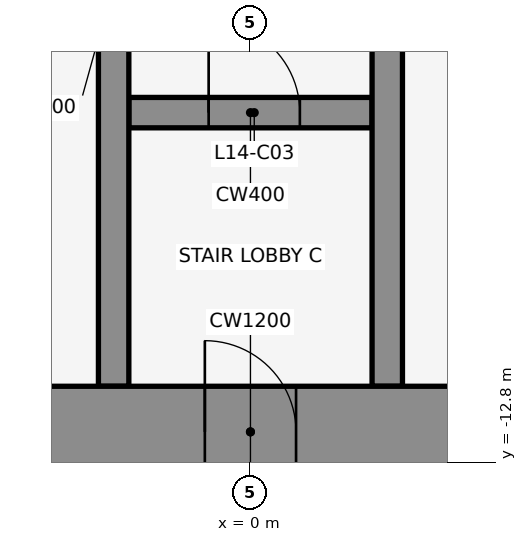
"""IFC4 building model, lengths in metres.
Left out: names, types, materials, properties, quantities, classifications, styles, units other than length and angle.
Written with IfcOpenShell. Run it as: python <this file> out.ifc"""

import sys

from ifc_helpers import new_model, si_unit, direction, frame, frame_2d, origin, place, context, subcontext, project, spatial, rectangle, extrude, element, fill, save


model = new_model("IFC4")
c1 = context("Model", 3, precision=1e-05, world=origin(), true_north=direction((0.0, 1.0)))
c2 = subcontext(c1, "Body", "Model", "MODEL_VIEW")
j1 = project(units=[si_unit("LENGTHUNIT", "METRE"), si_unit("PLANEANGLEUNIT", "RADIAN")], contexts=[c1])
p1 = place(None, origin())
s1 = spatial("IfcSite", under=j1, at=p1, CompositionType="ELEMENT")
p2 = place(p1, origin())
s2 = spatial("IfcBuilding", under=s1, at=p2, CompositionType="ELEMENT")
p3 = place(p2, frame((0.0, 0.0, 71.0)))
s3 = spatial("IfcBuildingStorey", under=s2, at=p3, CompositionType="ELEMENT", Elevation=71.0)
p4 = place(p3, frame((-1.6, -8.2, 0.0), z_axis=(0.0, 0.0, 1.0), x_axis=(1.0, 0.0, 0.0)))
e1 = element("IfcWall", 1, at=p4, inside=s3, PredefinedType="SHEAR", context=c2, shape_type="SweptSolid", body=[
    extrude(rectangle(XDim=3.2, YDim=0.4, at=frame_2d((1.6, 0.0))), origin(), (0.0, 0.0, 1.0), 4.5),
])
p5 = place(p4, frame((1.05, 0.0, 0.0)))
e2 = element("IfcOpeningElement", 2, at=p5, cuts=e1, PredefinedType="OPENING", context=c2, shape_type="SweptSolid", body=[
    extrude(rectangle(XDim=1.2, YDim=2.1, at=frame_2d((0.6, 1.05))), frame((0.0, 0.212, 0.0), z_axis=(0.0, -1.0, 0.0), x_axis=(1.0, 0.0, 0.0)), (0.0, 0.0, 1.0), 0.424),
])
for number, where, z_axis, x_axis in (
    (3, (-1.8, -11.8, 0.0), (0.0, 0.0, 1.0), (0.0, 1.0, 0.0)),
    (4, (1.8, -11.8, 0.0), (0.0, 0.0, 1.0), (0.0, 1.0, 0.0)),
):
    element("IfcWall", number, at=place(p3, frame(where, z_axis=z_axis, x_axis=x_axis)), inside=s3, PredefinedType="SHEAR", context=c2, shape_type="SweptSolid", body=[
        extrude(rectangle(XDim=10.6, YDim=0.4, at=frame_2d((5.3, 0.0))), origin(), (0.0, 0.0, 1.0), 4.5),
    ])
p6 = place(p3, frame((-22.0, -12.4, 0.0), z_axis=(0.0, 0.0, 1.0), x_axis=(1.0, 0.0, 0.0)))
e5 = element("IfcWall", 5, at=p6, inside=s3, PredefinedType="SHEAR", context=c2, shape_type="SweptSolid", body=[
    extrude(rectangle(XDim=44.0, YDim=1.2, at=frame_2d((22.0, 0.0))), origin(), (0.0, 0.0, 1.0), 4.5),
])
p7 = place(p6, frame((2.2, 0.0, 0.0)))
e6 = element("IfcOpeningElement", 6, at=p7, cuts=e5, PredefinedType="OPENING", context=c2, shape_type="SweptSolid", body=[
    extrude(rectangle(XDim=1.2, YDim=2.1, at=frame_2d((0.6, 1.05))), frame((0.0, 0.612, 0.0), z_axis=(0.0, -1.0, 0.0), x_axis=(1.0, 0.0, 0.0)), (0.0, 0.0, 1.0), 1.224),
])
p8 = place(p6, frame((21.4, 0.0, 0.0)))
e7 = element("IfcOpeningElement", 7, at=p8, cuts=e5, PredefinedType="OPENING", context=c2, shape_type="SweptSolid", body=[
    extrude(rectangle(XDim=1.2, YDim=2.1, at=frame_2d((0.6, 1.05))), frame((0.0, 0.612, 0.0), z_axis=(0.0, -1.0, 0.0), x_axis=(1.0, 0.0, 0.0)), (0.0, 0.0, 1.0), 1.224),
])
p9 = place(p6, frame((40.6, 0.0, 0.0)))
e8 = element("IfcOpeningElement", 8, at=p9, cuts=e5, PredefinedType="OPENING", context=c2, shape_type="SweptSolid", body=[
    extrude(rectangle(XDim=1.2, YDim=2.1, at=frame_2d((0.6, 1.05))), frame((0.0, 0.612, 0.0), z_axis=(0.0, -1.0, 0.0), x_axis=(1.0, 0.0, 0.0)), (0.0, 0.0, 1.0), 1.224),
])
p10 = place(p6, frame((16.0, 0.0, 0.0)))
e9 = element("IfcOpeningElement", 9, at=p10, cuts=e5, PredefinedType="OPENING", context=c2, shape_type="SweptSolid", body=[
    extrude(rectangle(XDim=1.8, YDim=2.1, at=frame_2d((0.9, 1.05))), frame((0.0, 0.612, 0.0), z_axis=(0.0, -1.0, 0.0), x_axis=(1.0, 0.0, 0.0)), (0.0, 0.0, 1.0), 1.224),
])
p11 = place(p6, frame((6.3, 0.0, 0.0)))
e10 = element("IfcOpeningElement", 10, at=p11, cuts=e5, PredefinedType="OPENING", context=c2, shape_type="SweptSolid", body=[
    extrude(rectangle(XDim=1.2, YDim=2.1, at=frame_2d((0.6, 1.05))), frame((0.0, 0.612, 0.0), z_axis=(0.0, -1.0, 0.0), x_axis=(1.0, 0.0, 0.0)), (0.0, 0.0, 1.0), 1.224),
])
p12 = place(p6, frame((26.2, 0.0, 0.0)))
e11 = element("IfcOpeningElement", 11, at=p12, cuts=e5, PredefinedType="OPENING", context=c2, shape_type="SweptSolid", body=[
    extrude(rectangle(XDim=1.8, YDim=2.1, at=frame_2d((0.9, 1.05))), frame((0.0, 0.612, 0.0), z_axis=(0.0, -1.0, 0.0), x_axis=(1.0, 0.0, 0.0)), (0.0, 0.0, 1.0), 1.224),
])
p13 = place(p6, frame((36.5, 0.0, 0.0)))
e12 = element("IfcOpeningElement", 12, at=p13, cuts=e5, PredefinedType="OPENING", context=c2, shape_type="SweptSolid", body=[
    extrude(rectangle(XDim=1.2, YDim=2.1, at=frame_2d((0.6, 1.05))), frame((0.0, 0.612, 0.0), z_axis=(0.0, -1.0, 0.0), x_axis=(1.0, 0.0, 0.0)), (0.0, 0.0, 1.0), 1.224),
])
p14 = place(p5, origin())
e13 = element("IfcDoor", 13, at=p14, inside=s3, OperationType="SINGLE_SWING_LEFT", PredefinedType="DOOR", context=c2, shape_type="SweptSolid", body=[
    extrude(rectangle(XDim=1.2, YDim=2.1, at=frame_2d((0.6, 1.05))), frame((0.0, 0.025, 0.0), z_axis=(0.0, -1.0, 0.0), x_axis=(1.0, 0.0, 0.0)), (0.0, 0.0, 1.0), 0.05),
])
fill(e2, e13)
p15 = place(p8, frame((1.2, 0.0, 0.0), z_axis=(0.0, 0.0, 1.0), x_axis=(-1.0, 0.0, 0.0)))
e14 = element("IfcDoor", 14, at=p15, inside=s3, OperationType="SINGLE_SWING_RIGHT", PredefinedType="DOOR", context=c2, shape_type="SweptSolid", body=[
    extrude(rectangle(XDim=1.2, YDim=2.1, at=frame_2d((0.6, 1.05))), frame((0.0, 0.025, 0.0), z_axis=(0.0, -1.0, 0.0), x_axis=(1.0, 0.0, 0.0)), (0.0, 0.0, 1.0), 0.05),
])
fill(e7, e14)
save(model, sys.argv[1])
